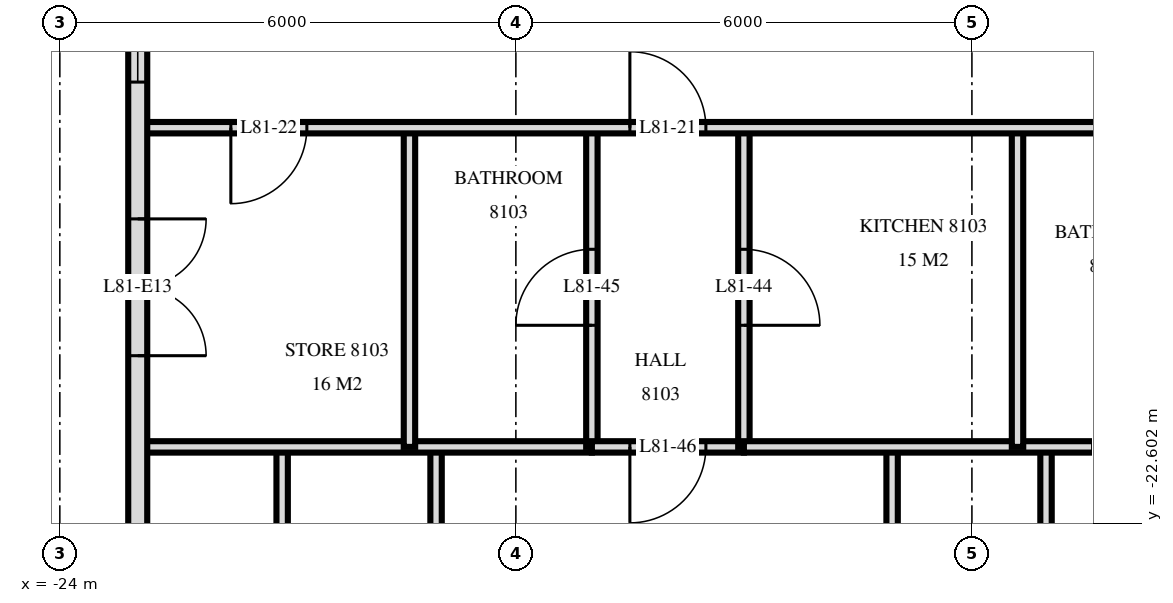
"""IFC4 building model, lengths in metres.
Left out: names, types, materials, properties, quantities, classifications, styles, units other than length and angle.
Written with IfcOpenShell. Run it as: python <this file> out.ifc"""

import sys

from ifc_helpers import new_model, si_unit, direction, frame, frame_2d, origin, place, context, subcontext, project, spatial, rectangle, extrude, element, fill, save


model = new_model("IFC4")
c1 = context("Model", 3, precision=1e-05, world=origin(), true_north=direction((0.0, 1.0)))
c2 = subcontext(c1, "Body", "Model", "MODEL_VIEW")
j1 = project(units=[si_unit("LENGTHUNIT", "METRE"), si_unit("PLANEANGLEUNIT", "RADIAN")], contexts=[c1])
p1 = place(None, origin())
s1 = spatial("IfcSite", under=j1, at=p1, CompositionType="ELEMENT")
p2 = place(p1, origin())
s2 = spatial("IfcBuilding", under=s1, at=p2, CompositionType="ELEMENT")
p3 = place(p2, frame((0.0, 0.0, 305.1)))
s3 = spatial("IfcBuildingStorey", under=s2, at=p3, CompositionType="ELEMENT", Elevation=305.1)
p4 = place(p3, frame((-11.025, -33.62, 0.0), z_axis=(0.0, 0.0, 1.0), x_axis=(0.0, 1.0, 0.0)))
e1 = element("IfcWall", 1, at=p4, inside=s3, PredefinedType="PARTITIONING", context=c2, shape_type="SweptSolid", body=[
    extrude(rectangle(XDim=12.02, YDim=0.15, at=frame_2d((6.01, 0.0))), origin(), (0.0, 0.0, 1.0), 3.22),
])
p5 = place(p4, frame((5.45, 0.0, 0.0)))
e2 = element("IfcOpeningElement", 2, at=p5, cuts=e1, PredefinedType="OPENING", context=c2, shape_type="SweptSolid", body=[
    extrude(rectangle(XDim=0.9, YDim=2.1, at=frame_2d((0.45, 1.05))), frame((0.0, 0.085, 0.0), z_axis=(0.0, -1.0, 0.0), x_axis=(1.0, 0.0, 0.0)), (0.0, 0.0, 1.0), 0.17),
])
p6 = place(p3, frame((-11.4, -21.6, 0.0), z_axis=(0.0, 0.0, 1.0), x_axis=(0.0, 1.0, 0.0)))
e3 = element("IfcWall", 3, at=p6, inside=s3, PredefinedType="PARTITIONING", context=c2, shape_type="SweptSolid", body=[
    extrude(rectangle(XDim=4.2, YDim=0.15, at=frame_2d((2.1, 0.0))), origin(), (0.0, 0.0, 1.0), 3.22),
])
p7 = place(p3, frame((-13.05, -33.62, 0.0), z_axis=(0.0, 0.0, 1.0), x_axis=(0.0, 1.0, 0.0)))
e4 = element("IfcWall", 4, at=p7, inside=s3, PredefinedType="PARTITIONING", context=c2, shape_type="SweptSolid", body=[
    extrude(rectangle(XDim=12.02, YDim=0.15, at=frame_2d((6.01, 0.0))), origin(), (0.0, 0.0, 1.0), 3.22),
])
p8 = place(p7, frame((5.45, 0.0, 0.0)))
e5 = element("IfcOpeningElement", 5, at=p8, cuts=e4, PredefinedType="OPENING", context=c2, shape_type="SweptSolid", body=[
    extrude(rectangle(XDim=0.9, YDim=2.1, at=frame_2d((0.45, 1.05))), frame((0.0, 0.085, 0.0), z_axis=(0.0, -1.0, 0.0), x_axis=(1.0, 0.0, 0.0)), (0.0, 0.0, 1.0), 0.17),
])
p9 = place(p3, frame((-15.0, -21.6, 0.0), z_axis=(0.0, 0.0, 1.0), x_axis=(0.0, 1.0, 0.0)))
e6 = element("IfcWall", 6, at=p9, inside=s3, PredefinedType="PARTITIONING", context=c2, shape_type="SweptSolid", body=[
    extrude(rectangle(XDim=4.2, YDim=0.15, at=frame_2d((2.1, 0.0))), origin(), (0.0, 0.0, 1.0), 3.22),
])
p10 = place(p9, frame((1.6, 0.0, 0.0)))
e7 = element("IfcOpeningElement", 7, at=p10, cuts=e6, PredefinedType="OPENING", context=c2, shape_type="SweptSolid", body=[
    extrude(rectangle(XDim=1.0, YDim=2.1, at=frame_2d((0.5, 1.05))), frame((0.0, 0.085, 0.0), z_axis=(0.0, -1.0, 0.0), x_axis=(1.0, 0.0, 0.0)), (0.0, 0.0, 1.0), 0.17),
])
p11 = place(p3, frame((-17.0, -21.6, 0.0), z_axis=(0.0, 0.0, 1.0), x_axis=(0.0, 1.0, 0.0)))
e8 = element("IfcWall", 8, at=p11, inside=s3, PredefinedType="PARTITIONING", context=c2, shape_type="SweptSolid", body=[
    extrude(rectangle(XDim=4.2, YDim=0.15, at=frame_2d((2.1, 0.0))), origin(), (0.0, 0.0, 1.0), 3.22),
])
p12 = place(p11, frame((1.6, 0.0, 0.0)))
e9 = element("IfcOpeningElement", 9, at=p12, cuts=e8, PredefinedType="OPENING", context=c2, shape_type="SweptSolid", body=[
    extrude(rectangle(XDim=1.0, YDim=2.1, at=frame_2d((0.5, 1.05))), frame((0.0, 0.085, 0.0), z_axis=(0.0, -1.0, 0.0), x_axis=(1.0, 0.0, 0.0)), (0.0, 0.0, 1.0), 0.17),
])
p13 = place(p3, frame((-19.05, -33.527, 0.0), z_axis=(0.0, 0.0, 1.0), x_axis=(0.0, 1.0, 0.0)))
e10 = element("IfcWall", 10, at=p13, inside=s3, PredefinedType="PARTITIONING", context=c2, shape_type="SweptSolid", body=[
    extrude(rectangle(XDim=11.927, YDim=0.15, at=frame_2d((5.963, 0.0))), origin(), (0.0, 0.0, 1.0), 3.22),
])
p14 = place(p13, frame((5.436, 0.0, 0.0)))
e11 = element("IfcOpeningElement", 11, at=p14, cuts=e10, PredefinedType="OPENING", context=c2, shape_type="SweptSolid", body=[
    extrude(rectangle(XDim=0.9, YDim=2.1, at=frame_2d((0.45, 1.05))), frame((0.0, 0.085, 0.0), z_axis=(0.0, -1.0, 0.0), x_axis=(1.0, 0.0, 0.0)), (0.0, 0.0, 1.0), 0.17),
])
p15 = place(p3, frame((-19.4, -21.6, 0.0), z_axis=(0.0, 0.0, 1.0), x_axis=(0.0, 1.0, 0.0)))
e12 = element("IfcWall", 12, at=p15, inside=s3, PredefinedType="PARTITIONING", context=c2, shape_type="SweptSolid", body=[
    extrude(rectangle(XDim=4.2, YDim=0.15, at=frame_2d((2.1, 0.0))), origin(), (0.0, 0.0, 1.0), 3.22),
])
p16 = place(p3, frame((-21.075, -32.666, 0.0), z_axis=(0.0, 0.0, 1.0), x_axis=(0.0, 1.0, 0.0)))
e13 = element("IfcWall", 13, at=p16, inside=s3, PredefinedType="PARTITIONING", context=c2, shape_type="SweptSolid", body=[
    extrude(rectangle(XDim=11.066, YDim=0.15, at=frame_2d((5.533, 0.0))), origin(), (0.0, 0.0, 1.0), 3.22),
])
p17 = place(p16, frame((4.932, 0.0, 0.0)))
e14 = element("IfcOpeningElement", 14, at=p17, cuts=e13, PredefinedType="OPENING", context=c2, shape_type="SweptSolid", body=[
    extrude(rectangle(XDim=0.9, YDim=2.1, at=frame_2d((0.45, 1.05))), frame((0.0, 0.085, 0.0), z_axis=(0.0, -1.0, 0.0), x_axis=(1.0, 0.0, 0.0)), (0.0, 0.0, 1.0), 0.17),
])
p18 = place(p3, frame((-17.0, -21.6, 0.0), z_axis=(0.0, 0.0, 1.0), x_axis=(1.0, 0.0, 0.0)))
e15 = element("IfcWall", 15, at=p18, inside=s3, PredefinedType="PARTITIONING", context=c2, shape_type="SweptSolid", body=[
    extrude(rectangle(XDim=2.0, YDim=0.15, at=frame_2d((1.0, 0.0))), origin(), (0.0, 0.0, 1.0), 3.22),
])
p19 = place(p18, frame((0.5, 0.0, 0.0)))
e16 = element("IfcOpeningElement", 16, at=p19, cuts=e15, PredefinedType="OPENING", context=c2, shape_type="SweptSolid", body=[
    extrude(rectangle(XDim=1.0, YDim=2.1, at=frame_2d((0.5, 1.05))), frame((0.0, 0.085, 0.0), z_axis=(0.0, -1.0, 0.0), x_axis=(1.0, 0.0, 0.0)), (0.0, 0.0, 1.0), 0.17),
])
p20 = place(p3, frame((-22.92, -21.6, 0.0), z_axis=(0.0, 0.0, 1.0), x_axis=(1.0, 0.0, 0.0)))
e17 = element("IfcWall", 17, at=p20, inside=s3, PredefinedType="PARTITIONING", context=c2, shape_type="SweptSolid", body=[
    extrude(rectangle(XDim=5.92, YDim=0.15, at=frame_2d((2.96, 0.0))), origin(), (0.0, 0.0, 1.0), 3.22),
])
p21 = place(p3, frame((-15.0, -21.6, 0.0), z_axis=(0.0, 0.0, 1.0), x_axis=(1.0, 0.0, 0.0)))
e18 = element("IfcWall", 18, at=p21, inside=s3, PredefinedType="PARTITIONING", context=c2, shape_type="SweptSolid", body=[
    extrude(rectangle(XDim=6.0, YDim=0.15, at=frame_2d((3.0, 0.0))), origin(), (0.0, 0.0, 1.0), 3.22),
])
p22 = place(p21, frame((4.588, 0.0, 0.0)))
e19 = element("IfcOpeningElement", 19, at=p22, cuts=e18, PredefinedType="OPENING", context=c2, shape_type="SweptSolid", body=[
    extrude(rectangle(XDim=0.8, YDim=2.1, at=frame_2d((0.4, 1.05))), frame((0.0, 0.085, 0.0), z_axis=(0.0, -1.0, 0.0), x_axis=(1.0, 0.0, 0.0)), (0.0, 0.0, 1.0), 0.17),
])
p23 = place(p3, frame((-22.92, -17.4, 0.0), z_axis=(0.0, 0.0, 1.0), x_axis=(1.0, 0.0, 0.0)))
e20 = element("IfcWall", 20, at=p23, inside=s3, PredefinedType="PARTITIONING", context=c2, shape_type="SweptSolid", body=[
    extrude(rectangle(XDim=45.84, YDim=0.15, at=frame_2d((22.92, 0.0))), origin(), (0.0, 0.0, 1.0), 3.22),
])
p24 = place(p23, frame((18.67, 0.0, 0.0)))
e21 = element("IfcOpeningElement", 21, at=p24, cuts=e20, PredefinedType="OPENING", context=c2, shape_type="SweptSolid", body=[
    extrude(rectangle(XDim=1.0, YDim=2.1, at=frame_2d((0.5, 1.05))), frame((0.0, 0.085, 0.0), z_axis=(0.0, -1.0, 0.0), x_axis=(1.0, 0.0, 0.0)), (0.0, 0.0, 1.0), 0.17),
])
p25 = place(p23, frame((20.32, 0.0, 0.0)))
e22 = element("IfcOpeningElement", 22, at=p25, cuts=e20, PredefinedType="OPENING", context=c2, shape_type="SweptSolid", body=[
    extrude(rectangle(XDim=1.0, YDim=2.1, at=frame_2d((0.5, 1.05))), frame((0.0, 0.085, 0.0), z_axis=(0.0, -1.0, 0.0), x_axis=(1.0, 0.0, 0.0)), (0.0, 0.0, 1.0), 0.17),
])
p26 = place(p23, frame((27.52, 0.0, 0.0)))
e23 = element("IfcOpeningElement", 23, at=p26, cuts=e20, PredefinedType="OPENING", context=c2, shape_type="SweptSolid", body=[
    extrude(rectangle(XDim=1.0, YDim=2.1, at=frame_2d((0.5, 1.05))), frame((0.0, 0.085, 0.0), z_axis=(0.0, -1.0, 0.0), x_axis=(1.0, 0.0, 0.0)), (0.0, 0.0, 1.0), 0.17),
])
p27 = place(p23, frame((6.42, 0.0, 0.0)))
e24 = element("IfcOpeningElement", 24, at=p27, cuts=e20, PredefinedType="OPENING", context=c2, shape_type="SweptSolid", body=[
    extrude(rectangle(XDim=1.0, YDim=2.1, at=frame_2d((0.5, 1.05))), frame((0.0, 0.085, 0.0), z_axis=(0.0, -1.0, 0.0), x_axis=(1.0, 0.0, 0.0)), (0.0, 0.0, 1.0), 0.17),
])
p28 = place(p23, frame((1.17, 0.0, 0.0)))
e25 = element("IfcOpeningElement", 25, at=p28, cuts=e20, PredefinedType="OPENING", context=c2, shape_type="SweptSolid", body=[
    extrude(rectangle(XDim=1.0, YDim=2.1, at=frame_2d((0.5, 1.05))), frame((0.0, 0.085, 0.0), z_axis=(0.0, -1.0, 0.0), x_axis=(1.0, 0.0, 0.0)), (0.0, 0.0, 1.0), 0.17),
])
p29 = place(p23, frame((35.42, 0.0, 0.0)))
e26 = element("IfcOpeningElement", 26, at=p29, cuts=e20, PredefinedType="OPENING", context=c2, shape_type="SweptSolid", body=[
    extrude(rectangle(XDim=1.0, YDim=2.1, at=frame_2d((0.5, 1.05))), frame((0.0, 0.085, 0.0), z_axis=(0.0, -1.0, 0.0), x_axis=(1.0, 0.0, 0.0)), (0.0, 0.0, 1.0), 0.17),
])
p30 = place(p23, frame((42.17, 0.0, 0.0)))
e27 = element("IfcOpeningElement", 27, at=p30, cuts=e20, PredefinedType="OPENING", context=c2, shape_type="SweptSolid", body=[
    extrude(rectangle(XDim=1.0, YDim=2.1, at=frame_2d((0.5, 1.05))), frame((0.0, 0.085, 0.0), z_axis=(0.0, -1.0, 0.0), x_axis=(1.0, 0.0, 0.0)), (0.0, 0.0, 1.0), 0.17),
])
p31 = place(p3, frame((-22.975, -8.678, 0.0), z_axis=(0.0, 0.0, 1.0), x_axis=(0.0, -1.0, 0.0)))
e28 = element("IfcWall", 28, at=p31, inside=s3, PredefinedType="SOLIDWALL", context=c2, shape_type="SweptSolid", body=[
    extrude(rectangle(XDim=20.598, YDim=0.25, at=frame_2d((10.299, 0.0))), origin(), (0.0, 0.0, 1.0), 3.2),
])
p32 = place(p31, frame((2.622, 0.0, 0.0)))
e29 = element("IfcOpeningElement", 29, at=p32, cuts=e28, PredefinedType="OPENING", context=c2, shape_type="SweptSolid", body=[
    extrude(rectangle(XDim=1.8, YDim=2.4, at=frame_2d((0.9, 1.2))), frame((0.0, 0.135, 0.0), z_axis=(0.0, -1.0, 0.0), x_axis=(1.0, 0.0, 0.0)), (0.0, 0.0, 1.0), 0.27),
])
p33 = place(p31, frame((6.922, 0.0, 0.9)))
e30 = element("IfcOpeningElement", 30, at=p33, cuts=e28, PredefinedType="OPENING", context=c2, shape_type="SweptSolid", body=[
    extrude(rectangle(XDim=1.2, YDim=1.5, at=frame_2d((0.6, 0.75))), frame((0.0, 0.135, 0.0), z_axis=(0.0, -1.0, 0.0), x_axis=(1.0, 0.0, 0.0)), (0.0, 0.0, 1.0), 0.27),
])
p34 = place(p31, frame((9.922, 0.0, 0.0)))
e31 = element("IfcOpeningElement", 31, at=p34, cuts=e28, PredefinedType="OPENING", context=c2, shape_type="SweptSolid", body=[
    extrude(rectangle(XDim=1.8, YDim=2.4, at=frame_2d((0.9, 1.2))), frame((0.0, 0.135, 0.0), z_axis=(0.0, -1.0, 0.0), x_axis=(1.0, 0.0, 0.0)), (0.0, 0.0, 1.0), 0.27),
])
p35 = place(p31, frame((15.722, 0.0, 0.0)))
e32 = element("IfcOpeningElement", 32, at=p35, cuts=e28, PredefinedType="OPENING", context=c2, shape_type="SweptSolid", body=[
    extrude(rectangle(XDim=1.8, YDim=2.4, at=frame_2d((0.9, 1.2))), frame((0.0, 0.135, 0.0), z_axis=(0.0, -1.0, 0.0), x_axis=(1.0, 0.0, 0.0)), (0.0, 0.0, 1.0), 0.27),
])
p36 = place(p31, frame((18.472, 0.0, 0.9)))
e33 = element("IfcOpeningElement", 33, at=p36, cuts=e28, PredefinedType="OPENING", context=c2, shape_type="SweptSolid", body=[
    extrude(rectangle(XDim=1.8, YDim=1.5, at=frame_2d((0.9, 0.75))), frame((0.0, 0.135, 0.0), z_axis=(0.0, -1.0, 0.0), x_axis=(1.0, 0.0, 0.0)), (0.0, 0.0, 1.0), 0.27),
])
p37 = place(p33, origin())
e34 = element("IfcWindow", 34, at=p37, inside=s3, PartitioningType="SINGLE_PANEL", PredefinedType="WINDOW", context=c2, shape_type="SweptSolid", body=[
    extrude(rectangle(XDim=1.2, YDim=1.5, at=frame_2d((0.6, 0.75))), frame((0.0, 0.03, 0.0), z_axis=(0.0, -1.0, 0.0), x_axis=(1.0, 0.0, 0.0)), (0.0, 0.0, 1.0), 0.06),
])
fill(e30, e34)
p38 = place(p34, origin())
e35 = element("IfcDoor", 35, at=p38, inside=s3, OperationType="DOUBLE_DOOR_SINGLE_SWING", PredefinedType="DOOR", context=c2, shape_type="SweptSolid", body=[
    extrude(rectangle(XDim=1.8, YDim=2.4, at=frame_2d((0.9, 1.2))), frame((0.0, 0.025, 0.0), z_axis=(0.0, -1.0, 0.0), x_axis=(1.0, 0.0, 0.0)), (0.0, 0.0, 1.0), 0.05),
])
fill(e31, e35)
p39 = place(p27, origin())
e36 = element("IfcDoor", 36, at=p39, inside=s3, OperationType="SINGLE_SWING_RIGHT", PredefinedType="DOOR", context=c2, shape_type="SweptSolid", body=[
    extrude(rectangle(XDim=1.0, YDim=2.1, at=frame_2d((0.5, 1.05))), frame((0.0, 0.025, 0.0), z_axis=(0.0, -1.0, 0.0), x_axis=(1.0, 0.0, 0.0)), (0.0, 0.0, 1.0), 0.05),
])
fill(e24, e36)
p40 = place(p28, frame((0.5, 0.0, 0.0), z_axis=(0.0, 0.0, 1.0), x_axis=(-1.0, 0.0, 0.0)))
e37 = element("IfcDoor", 37, at=p40, inside=s3, OperationType="SINGLE_SWING_LEFT", PredefinedType="DOOR", context=c2, shape_type="SweptSolid", body=[
    extrude(rectangle(XDim=1.0, YDim=2.1, at=frame_2d((0.0, 1.05))), frame((0.0, -0.025, 0.0), z_axis=(0.0, 1.0, 0.0), x_axis=(-1.0, 0.0, 0.0)), (0.0, 0.0, 1.0), 0.05),
])
fill(e25, e37)
p41 = place(p22, origin())
e38 = element("IfcDoor", 38, at=p41, inside=s3, OperationType="SINGLE_SWING_LEFT", PredefinedType="DOOR", context=c2, shape_type="SweptSolid", body=[
    extrude(rectangle(XDim=0.8, YDim=2.1, at=frame_2d((0.4, 1.05))), frame((0.0, 0.025, 0.0), z_axis=(0.0, -1.0, 0.0), x_axis=(1.0, 0.0, 0.0)), (0.0, 0.0, 1.0), 0.05),
])
fill(e19, e38)
p42 = place(p10, frame((0.5, 0.0, 0.0), z_axis=(0.0, 0.0, 1.0), x_axis=(-1.0, 0.0, 0.0)))
e39 = element("IfcDoor", 39, at=p42, inside=s3, OperationType="SINGLE_SWING_LEFT", PredefinedType="DOOR", context=c2, shape_type="SweptSolid", body=[
    extrude(rectangle(XDim=1.0, YDim=2.1, at=frame_2d((0.0, 1.05))), frame((0.0, -0.025, 0.0), z_axis=(0.0, 1.0, 0.0), x_axis=(-1.0, 0.0, 0.0)), (0.0, 0.0, 1.0), 0.05),
])
fill(e7, e39)
p43 = place(p12, origin())
e40 = element("IfcDoor", 40, at=p43, inside=s3, OperationType="SINGLE_SWING_RIGHT", PredefinedType="DOOR", context=c2, shape_type="SweptSolid", body=[
    extrude(rectangle(XDim=1.0, YDim=2.1, at=frame_2d((0.5, 1.05))), frame((0.0, 0.025, 0.0), z_axis=(0.0, -1.0, 0.0), x_axis=(1.0, 0.0, 0.0)), (0.0, 0.0, 1.0), 0.05),
])
fill(e9, e40)
p44 = place(p19, frame((0.5, 0.0, 0.0), z_axis=(0.0, 0.0, 1.0), x_axis=(-1.0, 0.0, 0.0)))
e41 = element("IfcDoor", 41, at=p44, inside=s3, OperationType="SINGLE_SWING_LEFT", PredefinedType="DOOR", context=c2, shape_type="SweptSolid", body=[
    extrude(rectangle(XDim=1.0, YDim=2.1, at=frame_2d((0.0, 1.05))), frame((0.0, -0.025, 0.0), z_axis=(0.0, 1.0, 0.0), x_axis=(-1.0, 0.0, 0.0)), (0.0, 0.0, 1.0), 0.05),
])
fill(e16, e41)
save(model, sys.argv[1])
